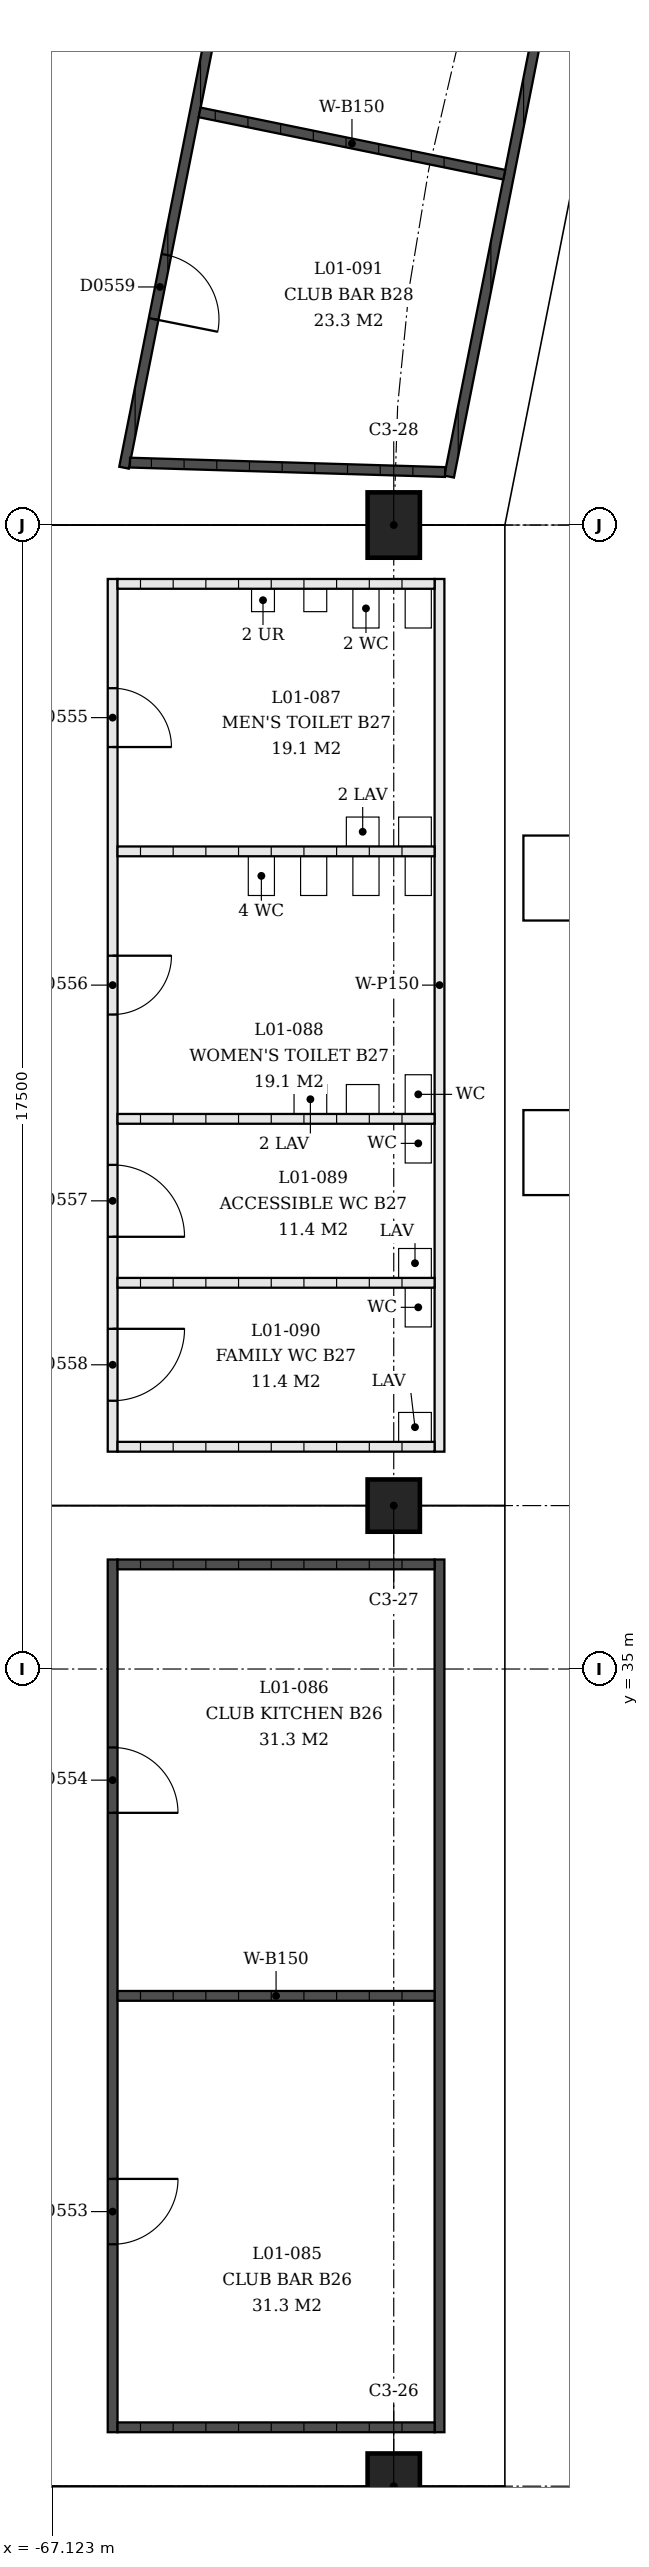
"""IFC4 building model, lengths in metres.
Left out: names, types, materials, properties, quantities, classifications, styles, units other than length and angle.
Written with IfcOpenShell. Run it as: python <this file> out.ifc"""

import sys

from ifc_helpers import new_model, si_unit, direction, frame, frame_2d, origin, origin_2d, place, context, subcontext, project, spatial, rectangle, extrude, element, fill, save


model = new_model("IFC4")
c1 = context("Model", 3, precision=1e-05, world=origin(), true_north=direction((0.0, 1.0)))
c2 = subcontext(c1, "Body", "Model", "MODEL_VIEW")
j1 = project(units=[si_unit("LENGTHUNIT", "METRE"), si_unit("PLANEANGLEUNIT", "RADIAN")], contexts=[c1])
p1 = place(None, origin())
s1 = spatial("IfcSite", under=j1, at=p1, CompositionType="ELEMENT")
p2 = place(p1, origin())
s2 = spatial("IfcBuilding", under=s1, at=p2, CompositionType="ELEMENT")
p3 = place(p2, frame((0.0, 0.0, 4.5)))
s3 = spatial("IfcBuildingStorey", under=s2, at=p3, CompositionType="ELEMENT", Elevation=4.5)
p4 = place(p3, frame((-61.9, 22.5, 0.0), z_axis=(0.0, 0.0, 1.0), x_axis=(0.0, -1.0, 0.0)))
e1 = element("IfcColumn", 1, at=p4, inside=s3, PredefinedType="COLUMN", context=c2, shape_type="SweptSolid", body=[
    extrude(rectangle(XDim=1.0, YDim=0.8, at=origin_2d()), origin(), (0.0, 0.0, 1.0), 4.5),
])
p5 = place(p3, frame((-61.9, 37.5, 0.0), z_axis=(0.0, 0.0, 1.0), x_axis=(0.0, -1.0, 0.0)))
e2 = element("IfcColumn", 2, at=p5, inside=s3, PredefinedType="COLUMN", context=c2, shape_type="SweptSolid", body=[
    extrude(rectangle(XDim=0.8, YDim=0.8, at=origin_2d()), origin(), (0.0, 0.0, 1.0), 4.5),
])
p6 = place(p3, frame((-61.9, 52.5, 0.0), z_axis=(0.0, 0.0, 1.0), x_axis=(0.0, -1.0, 0.0)))
e3 = element("IfcColumn", 3, at=p6, inside=s3, PredefinedType="COLUMN", context=c2, shape_type="SweptSolid", body=[
    extrude(rectangle(XDim=1.0, YDim=0.8, at=origin_2d()), origin(), (0.0, 0.0, 1.0), 4.5),
])
p7 = place(p3, frame((-61.2, 23.325, 0.0), z_axis=(0.0, 0.0, 1.0), x_axis=(0.0, 1.0, 0.0)))
e4 = element("IfcWall", 4, at=p7, inside=s3, PredefinedType="SOLIDWALL", context=c2, shape_type="SweptSolid", body=[
    extrude(rectangle(XDim=13.35, YDim=0.15, at=frame_2d((6.675, 0.0))), origin(), (0.0, 0.0, 1.0), 3.0),
])
p8 = place(p3, frame((-66.2, 23.325, 0.0), z_axis=(0.0, 0.0, 1.0), x_axis=(0.0, 1.0, 0.0)))
e5 = element("IfcWall", 5, at=p8, inside=s3, PredefinedType="SOLIDWALL", context=c2, shape_type="SweptSolid", body=[
    extrude(rectangle(XDim=13.35, YDim=0.15, at=frame_2d((6.675, 0.0))), origin(), (0.0, 0.0, 1.0), 3.0),
])
p9 = place(p8, frame((2.875, 0.0, 0.0)))
e6 = element("IfcOpeningElement", 6, at=p9, cuts=e5, PredefinedType="OPENING", context=c2, shape_type="SweptSolid", body=[
    extrude(rectangle(XDim=1.0, YDim=2.1, at=frame_2d((0.5, 1.05))), frame((0.0, 0.075, 0.0), z_axis=(0.0, -1.0, 0.0), x_axis=(1.0, 0.0, 0.0)), (0.0, 0.0, 1.0), 0.15),
])
p10 = place(p8, frame((9.475, 0.0, 0.0)))
e7 = element("IfcOpeningElement", 7, at=p10, cuts=e5, PredefinedType="OPENING", context=c2, shape_type="SweptSolid", body=[
    extrude(rectangle(XDim=1.0, YDim=2.1, at=frame_2d((0.5, 1.05))), frame((0.0, 0.075, 0.0), z_axis=(0.0, -1.0, 0.0), x_axis=(1.0, 0.0, 0.0)), (0.0, 0.0, 1.0), 0.15),
])
for number, where, z_axis, x_axis in (
    (8, (-61.275, 23.4, 0.0), (0.0, 0.0, 1.0), (-1.0, 0.0, 0.0)),
    (9, (-61.275, 30.0, 0.0), (0.0, 0.0, 1.0), (-1.0, 0.0, 0.0)),
    (10, (-61.275, 36.6, 0.0), (0.0, 0.0, 1.0), (-1.0, 0.0, 0.0)),
):
    element("IfcWall", number, at=place(p3, frame(where, z_axis=z_axis, x_axis=x_axis)), inside=s3, PredefinedType="SOLIDWALL", context=c2, shape_type="SweptSolid", body=[
        extrude(rectangle(XDim=4.85, YDim=0.15, at=frame_2d((2.425, 0.0))), origin(), (0.0, 0.0, 1.0), 3.0),
    ])
p11 = place(p3, frame((-61.2, 51.675, 0.0), z_axis=(0.0, 0.0, 1.0), x_axis=(0.0, -1.0, 0.0)))
e11 = element("IfcWall", 11, at=p11, inside=s3, PredefinedType="PARTITIONING", context=c2, shape_type="SweptSolid", body=[
    extrude(rectangle(XDim=13.35, YDim=0.15, at=frame_2d((6.675, 0.0))), origin(), (0.0, 0.0, 1.0), 3.0),
])
p12 = place(p3, frame((-66.2, 51.675, 0.0), z_axis=(0.0, 0.0, 1.0), x_axis=(0.0, -1.0, 0.0)))
e12 = element("IfcWall", 12, at=p12, inside=s3, PredefinedType="PARTITIONING", context=c2, shape_type="SweptSolid", body=[
    extrude(rectangle(XDim=13.35, YDim=0.15, at=frame_2d((6.675, 0.0))), origin(), (0.0, 0.0, 1.0), 3.0),
])
p13 = place(p12, frame((1.671, 0.0, 0.0)))
e13 = element("IfcOpeningElement", 13, at=p13, cuts=e12, PredefinedType="OPENING", context=c2, shape_type="SweptSolid", body=[
    extrude(rectangle(XDim=0.9, YDim=2.1, at=frame_2d((0.45, 1.05))), frame((0.0, 0.075, 0.0), z_axis=(0.0, -1.0, 0.0), x_axis=(1.0, 0.0, 0.0)), (0.0, 0.0, 1.0), 0.15),
])
p14 = place(p12, frame((5.763, 0.0, 0.0)))
e14 = element("IfcOpeningElement", 14, at=p14, cuts=e12, PredefinedType="OPENING", context=c2, shape_type="SweptSolid", body=[
    extrude(rectangle(XDim=0.9, YDim=2.1, at=frame_2d((0.45, 1.05))), frame((0.0, 0.075, 0.0), z_axis=(0.0, -1.0, 0.0), x_axis=(1.0, 0.0, 0.0)), (0.0, 0.0, 1.0), 0.15),
])
p15 = place(p12, frame((8.963, 0.0, 0.0)))
e15 = element("IfcOpeningElement", 15, at=p15, cuts=e12, PredefinedType="OPENING", context=c2, shape_type="SweptSolid", body=[
    extrude(rectangle(XDim=1.1, YDim=2.1, at=frame_2d((0.55, 1.05))), frame((0.0, 0.075, 0.0), z_axis=(0.0, -1.0, 0.0), x_axis=(1.0, 0.0, 0.0)), (0.0, 0.0, 1.0), 0.15),
])
p16 = place(p12, frame((11.471, 0.0, 0.0)))
e16 = element("IfcOpeningElement", 16, at=p16, cuts=e12, PredefinedType="OPENING", context=c2, shape_type="SweptSolid", body=[
    extrude(rectangle(XDim=1.1, YDim=2.1, at=frame_2d((0.55, 1.05))), frame((0.0, 0.075, 0.0), z_axis=(0.0, -1.0, 0.0), x_axis=(1.0, 0.0, 0.0)), (0.0, 0.0, 1.0), 0.15),
])
for number, where, z_axis, x_axis in (
    (17, (-61.275, 51.6, 0.0), (0.0, 0.0, 1.0), (-1.0, 0.0, 0.0)),
    (18, (-61.275, 47.508, 0.0), (0.0, 0.0, 1.0), (-1.0, 0.0, 0.0)),
    (19, (-61.275, 43.416, 0.0), (0.0, 0.0, 1.0), (-1.0, 0.0, 0.0)),
    (20, (-61.275, 40.908, 0.0), (0.0, 0.0, 1.0), (-1.0, 0.0, 0.0)),
    (21, (-61.275, 38.4, 0.0), (0.0, 0.0, 1.0), (-1.0, 0.0, 0.0)),
):
    element("IfcWall", number, at=place(p3, frame(where, z_axis=z_axis, x_axis=x_axis)), inside=s3, PredefinedType="PARTITIONING", context=c2, shape_type="SweptSolid", body=[
        extrude(rectangle(XDim=4.85, YDim=0.15, at=frame_2d((2.425, 0.0))), origin(), (0.0, 0.0, 1.0), 3.0),
    ])
p17 = place(p3, frame((-61.052, 53.241, 0.0), z_axis=(0.0, 0.0, 1.0), x_axis=(0.195075759432, 0.980788176969, 0.0)))
e22 = element("IfcWall", 22, at=p17, inside=s3, PredefinedType="SOLIDWALL", context=c2, shape_type="SweptSolid", body=[
    extrude(rectangle(XDim=9.388, YDim=0.15, at=frame_2d((4.694, 0.0))), origin(), (0.0, 0.0, 1.0), 3.0),
])
p18 = place(p3, frame((-66.025, 53.377, 0.0), z_axis=(0.0, 0.0, 1.0), x_axis=(0.195076764682, 0.980787977027, 0.0)))
e23 = element("IfcWall", 23, at=p18, inside=s3, PredefinedType="SOLIDWALL", context=c2, shape_type="SweptSolid", body=[
    extrude(rectangle(XDim=11.114, YDim=0.15, at=frame_2d((5.557, 0.0))), origin(), (0.0, 0.0, 1.0), 3.0),
])
p19 = place(p18, frame((2.319, 0.0, 0.0)))
e24 = element("IfcOpeningElement", 24, at=p19, cuts=e23, PredefinedType="OPENING", context=c2, shape_type="SweptSolid", body=[
    extrude(rectangle(XDim=1.0, YDim=2.1, at=frame_2d((0.5, 1.05))), frame((0.0, 0.075, 0.0), z_axis=(0.0, -1.0, 0.0), x_axis=(1.0, 0.0, 0.0)), (0.0, 0.0, 1.0), 0.15),
])
p20 = place(p18, frame((7.794, 0.0, 0.0)))
e25 = element("IfcOpeningElement", 25, at=p20, cuts=e23, PredefinedType="OPENING", context=c2, shape_type="SweptSolid", body=[
    extrude(rectangle(XDim=1.0, YDim=2.1, at=frame_2d((0.5, 1.05))), frame((0.0, 0.075, 0.0), z_axis=(0.0, -1.0, 0.0), x_axis=(1.0, 0.0, 0.0)), (0.0, 0.0, 1.0), 0.15),
])
p21 = place(p3, frame((-61.114, 53.311, 0.0), z_axis=(0.0, 0.0, 1.0), x_axis=(-0.999552485488, 0.02991368842, 0.0)))
e26 = element("IfcWall", 26, at=p21, inside=s3, PredefinedType="SOLIDWALL", context=c2, shape_type="SweptSolid", body=[
    extrude(rectangle(XDim=4.823, YDim=0.15, at=frame_2d((2.412, 0.0))), origin(), (0.0, 0.0, 1.0), 3.0),
])
p22 = place(p3, frame((-60.209, 57.859, 0.0), z_axis=(0.0, 0.0, 1.0), x_axis=(-0.979720657149, 0.200368245875, 0.0)))
e27 = element("IfcWall", 27, at=p22, inside=s3, PredefinedType="SOLIDWALL", context=c2, shape_type="SweptSolid", body=[
    extrude(rectangle(XDim=4.757, YDim=0.15, at=frame_2d((2.378, 0.0))), origin(), (0.0, 0.0, 1.0), 3.0),
])
p23 = place(p9, origin())
e28 = element("IfcDoor", 28, at=p23, inside=s3, OperationType="SINGLE_SWING_RIGHT", PredefinedType="DOOR", context=c2, shape_type="SweptSolid", body=[
    extrude(rectangle(XDim=1.0, YDim=2.1, at=frame_2d((0.5, 1.05))), frame((0.0, 0.025, 0.0), z_axis=(0.0, -1.0, 0.0), x_axis=(1.0, 0.0, 0.0)), (0.0, 0.0, 1.0), 0.05),
])
fill(e6, e28)
p24 = place(p10, origin())
e29 = element("IfcDoor", 29, at=p24, inside=s3, OperationType="SINGLE_SWING_LEFT", PredefinedType="DOOR", context=c2, shape_type="SweptSolid", body=[
    extrude(rectangle(XDim=1.0, YDim=2.1, at=frame_2d((0.5, 1.05))), frame((0.0, 0.025, 0.0), z_axis=(0.0, -1.0, 0.0), x_axis=(1.0, 0.0, 0.0)), (0.0, 0.0, 1.0), 0.05),
])
fill(e7, e29)
p25 = place(p13, origin())
e30 = element("IfcDoor", 30, at=p25, inside=s3, OperationType="SINGLE_SWING_LEFT", PredefinedType="DOOR", context=c2, shape_type="SweptSolid", body=[
    extrude(rectangle(XDim=0.9, YDim=2.1, at=frame_2d((0.45, 1.05))), frame((0.0, 0.025, 0.0), z_axis=(0.0, -1.0, 0.0), x_axis=(1.0, 0.0, 0.0)), (0.0, 0.0, 1.0), 0.05),
])
fill(e13, e30)
p26 = place(p14, origin())
e31 = element("IfcDoor", 31, at=p26, inside=s3, OperationType="SINGLE_SWING_RIGHT", PredefinedType="DOOR", context=c2, shape_type="SweptSolid", body=[
    extrude(rectangle(XDim=0.9, YDim=2.1, at=frame_2d((0.45, 1.05))), frame((0.0, 0.025, 0.0), z_axis=(0.0, -1.0, 0.0), x_axis=(1.0, 0.0, 0.0)), (0.0, 0.0, 1.0), 0.05),
])
fill(e14, e31)
p27 = place(p15, origin())
e32 = element("IfcDoor", 32, at=p27, inside=s3, OperationType="SINGLE_SWING_LEFT", PredefinedType="DOOR", context=c2, shape_type="SweptSolid", body=[
    extrude(rectangle(XDim=1.1, YDim=2.1, at=frame_2d((0.55, 1.05))), frame((0.0, 0.025, 0.0), z_axis=(0.0, -1.0, 0.0), x_axis=(1.0, 0.0, 0.0)), (0.0, 0.0, 1.0), 0.05),
])
fill(e15, e32)
p28 = place(p16, origin())
e33 = element("IfcDoor", 33, at=p28, inside=s3, OperationType="SINGLE_SWING_RIGHT", PredefinedType="DOOR", context=c2, shape_type="SweptSolid", body=[
    extrude(rectangle(XDim=1.1, YDim=2.1, at=frame_2d((0.55, 1.05))), frame((0.0, 0.025, 0.0), z_axis=(0.0, -1.0, 0.0), x_axis=(1.0, 0.0, 0.0)), (0.0, 0.0, 1.0), 0.05),
])
fill(e16, e33)
p29 = place(p19, origin())
e34 = element("IfcDoor", 34, at=p29, inside=s3, OperationType="SINGLE_SWING_LEFT", PredefinedType="DOOR", context=c2, shape_type="SweptSolid", body=[
    extrude(rectangle(XDim=1.0, YDim=2.1, at=frame_2d((0.5, 1.05))), frame((0.0, 0.025, 0.0), z_axis=(0.0, -1.0, 0.0), x_axis=(1.0, 0.0, 0.0)), (0.0, 0.0, 1.0), 0.05),
])
fill(e24, e34)
save(model, sys.argv[1])
